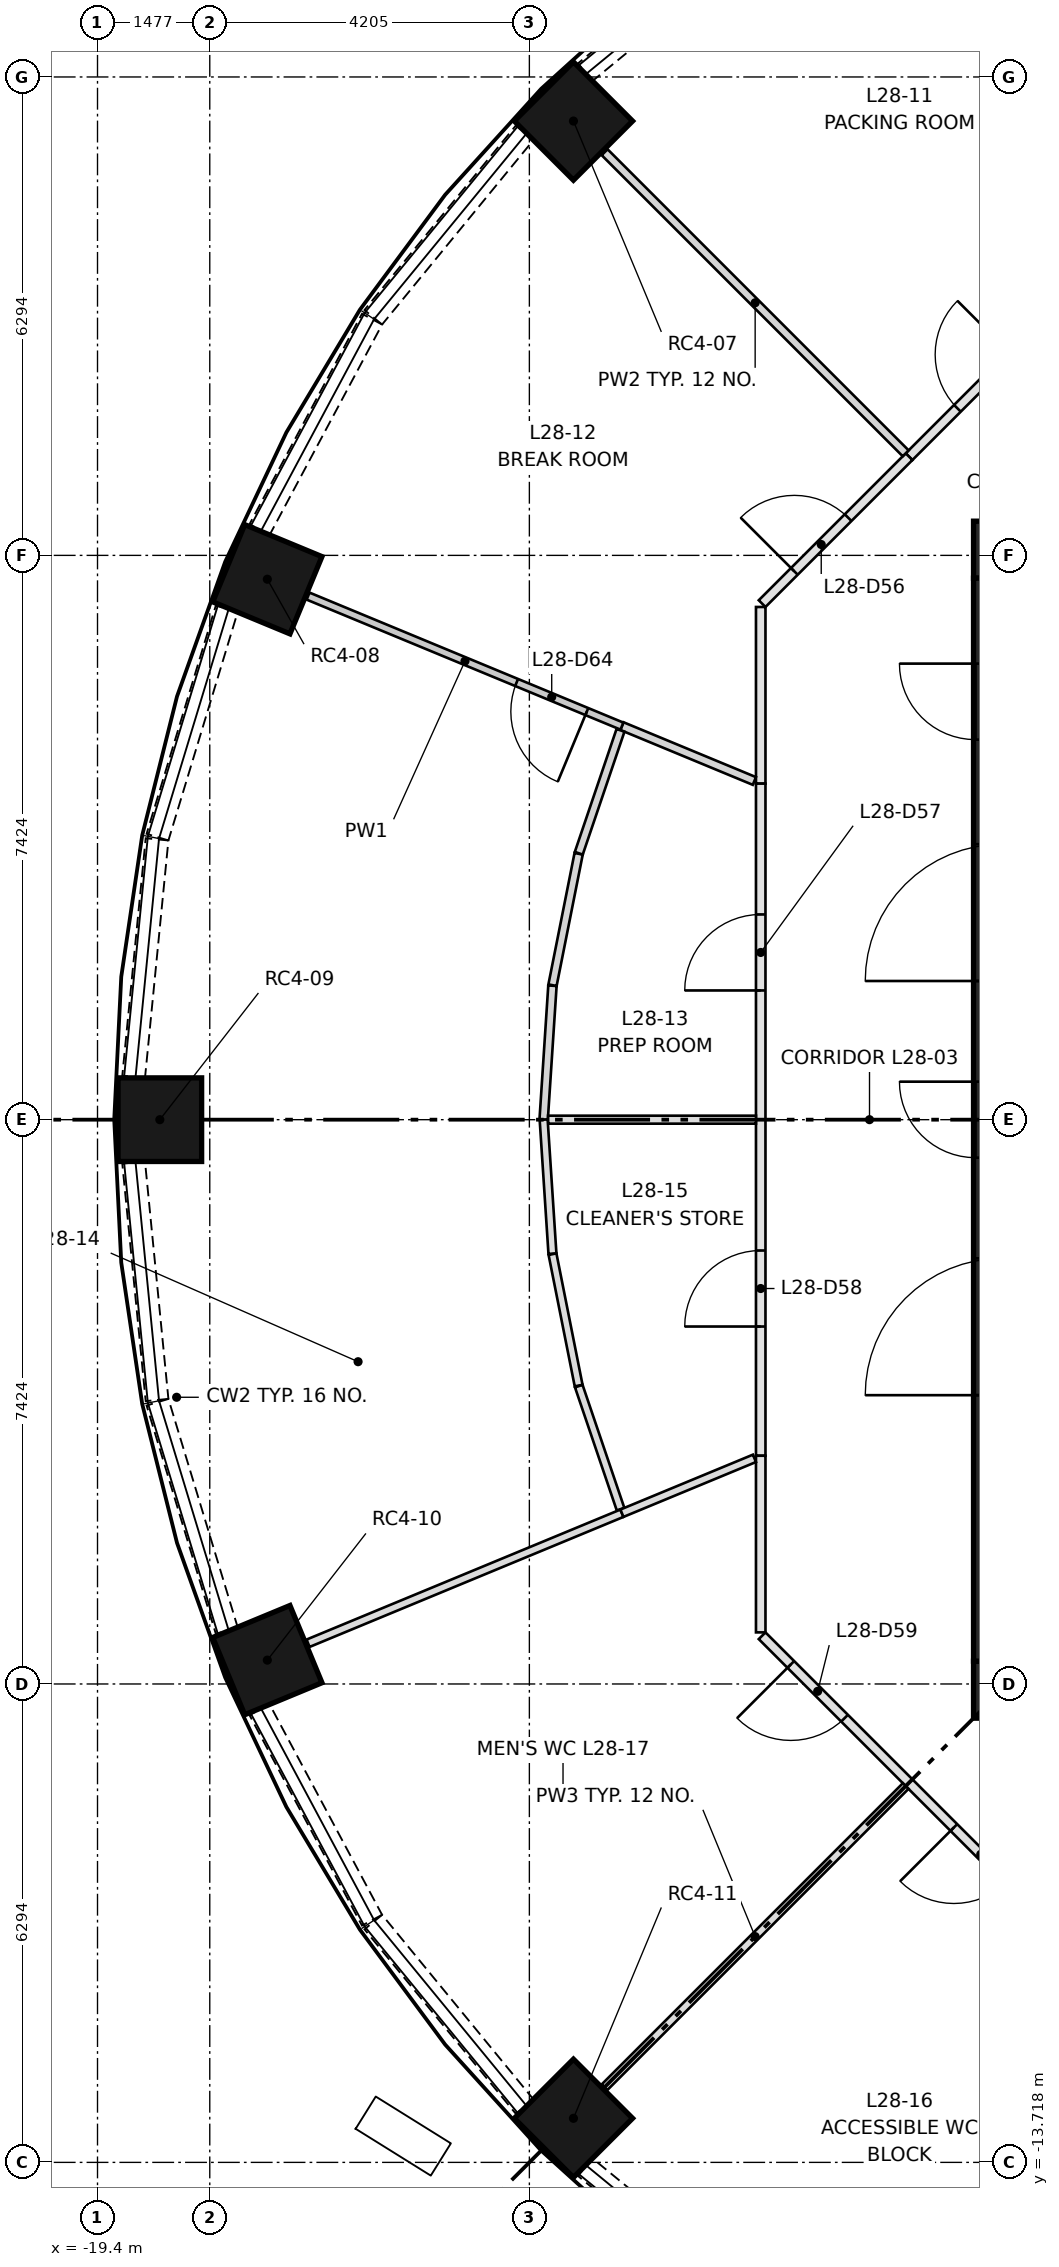
"""IFC4 building model, lengths in metres.
Left out: names, types, materials, properties, quantities, classifications, styles, units other than length and angle.
Written with IfcOpenShell. Run it as: python <this file> out.ifc"""

import sys

from ifc_helpers import new_model, si_unit, direction, frame, frame_2d, origin, origin_2d, place, context, subcontext, project, spatial, rectangle, extrude, element, fill, save


model = new_model("IFC4")
c1 = context("Model", 3, precision=1e-05, world=origin(), true_north=direction((0.0, 1.0)))
c2 = subcontext(c1, "Body", "Model", "MODEL_VIEW")
j1 = project(units=[si_unit("LENGTHUNIT", "METRE"), si_unit("PLANEANGLEUNIT", "RADIAN")], contexts=[c1])
p1 = place(None, origin())
s1 = spatial("IfcSite", under=j1, at=p1, CompositionType="ELEMENT")
p2 = place(p1, origin())
s2 = spatial("IfcBuilding", under=s1, at=p2, CompositionType="ELEMENT")
p3 = place(p2, frame((0.0, 0.0, 109.25)))
s3 = spatial("IfcBuildingStorey", under=s2, at=p3, CompositionType="ELEMENT", Elevation=109.25)
for number, where, z_axis, x_axis in (
    (1, (-13.138, 13.138, 0.0), (0.0, 0.0, 1.0), (-0.707, 0.707, 0.0)),
    (2, (-17.166, 7.11, 0.0), (0.0, 0.0, 1.0), (-0.924, 0.383, 0.0)),
    (3, (-18.58, 0.0, 0.0), (0.0, 0.0, 1.0), (-1.0, 0.0, 0.0)),
    (4, (-17.166, -7.11, 0.0), (0.0, 0.0, 1.0), (-0.924, -0.383, 0.0)),
    (5, (-13.138, -13.138, 0.0), (0.0, 0.0, 1.0), (-0.707, -0.707, 0.0)),
):
    element("IfcColumn", number, at=place(p3, frame(where, z_axis=z_axis, x_axis=x_axis)), inside=s3, PredefinedType="COLUMN", context=c2, shape_type="SweptSolid", body=[
        extrude(rectangle(XDim=1.1, YDim=1.1, at=origin_2d()), origin(), (0.0, 0.0, 1.0), 3.65),
    ])
for number, where, z_axis, x_axis in (
    (6, (-7.874, -7.499, 0.0), (0.0, 0.0, 1.0), (1.0, 0.0, 0.0)),
    (7, (-7.874, 7.499, 0.0), (0.0, 0.0, 1.0), (1.0, 0.0, 0.0)),
):
    element("IfcWall", number, at=place(p3, frame(where, z_axis=z_axis, x_axis=x_axis)), inside=s3, PredefinedType="SHEAR", context=c2, shape_type="SweptSolid", body=[
        extrude(rectangle(XDim=15.748, YDim=0.75, at=frame_2d((7.874, 0.0))), origin(), (0.0, 0.0, 1.0), 3.65),
    ])
p4 = place(p3, frame((-7.499, -7.124, 0.0), z_axis=(0.0, 0.0, 1.0), x_axis=(0.0, 1.0, 0.0)))
e8 = element("IfcWall", 8, at=p4, inside=s3, PredefinedType="SHEAR", context=c2, shape_type="SweptSolid", body=[
    extrude(rectangle(XDim=14.248, YDim=0.75, at=frame_2d((7.124, 0.0))), origin(), (0.0, 0.0, 1.0), 3.65),
])
p5 = place(p4, frame((6.624, 0.0, 0.0)))
e9 = element("IfcOpeningElement", 9, at=p5, cuts=e8, PredefinedType="OPENING", context=c2, shape_type="SweptSolid", body=[
    extrude(rectangle(XDim=1.0, YDim=2.1, at=frame_2d((0.5, 1.05))), frame((0.0, 0.385, 0.0), z_axis=(0.0, -1.0, 0.0), x_axis=(1.0, 0.0, 0.0)), (0.0, 0.0, 1.0), 0.77),
])
p6 = place(p4, frame((3.5, 0.0, 0.0)))
e10 = element("IfcOpeningElement", 10, at=p6, cuts=e8, PredefinedType="OPENING", context=c2, shape_type="SweptSolid", body=[
    extrude(rectangle(XDim=1.8, YDim=2.1, at=frame_2d((0.9, 1.05))), frame((0.0, 0.385, 0.0), z_axis=(0.0, -1.0, 0.0), x_axis=(1.0, 0.0, 0.0)), (0.0, 0.0, 1.0), 0.77),
])
p7 = place(p4, frame((8.948, 0.0, 0.0)))
e11 = element("IfcOpeningElement", 11, at=p7, cuts=e8, PredefinedType="OPENING", context=c2, shape_type="SweptSolid", body=[
    extrude(rectangle(XDim=1.8, YDim=2.1, at=frame_2d((0.9, 1.05))), frame((0.0, 0.385, 0.0), z_axis=(0.0, -1.0, 0.0), x_axis=(1.0, 0.0, 0.0)), (0.0, 0.0, 1.0), 0.77),
])
p8 = place(p4, frame((12.124, 0.0, 0.0)))
e12 = element("IfcOpeningElement", 12, at=p8, cuts=e8, PredefinedType="OPENING", context=c2, shape_type="SweptSolid", body=[
    extrude(rectangle(XDim=1.0, YDim=2.1, at=frame_2d((0.5, 1.05))), frame((0.0, 0.385, 0.0), z_axis=(0.0, -1.0, 0.0), x_axis=(1.0, 0.0, 0.0)), (0.0, 0.0, 1.0), 0.77),
])
for number, where, z_axis, x_axis in (
    (13, (-10.557, 15.771, 0.0), (0.0, 0.0, 1.0), (-0.773, -0.634, 0.0)),
    (14, (-13.781, 12.983, 0.0), (0.0, 0.0, 1.0), (-0.634, -0.773, 0.0)),
):
    element("IfcWall", number, at=place(p3, frame(where, z_axis=z_axis, x_axis=x_axis)), inside=s3, PredefinedType="SOLIDWALL", context=c2, shape_type="SweptSolid", body=[
        extrude(rectangle(XDim=3.139, YDim=0.3, at=frame_2d((1.569, 0.0))), origin(), (0.0, 0.0, 1.0), 0.9),
    ])
p9 = place(p3, frame((-15.788, 10.532, 0.0), z_axis=(0.0, 0.0, 1.0), x_axis=(-0.471375185282, -0.88193278355, 0.0)))
e15 = element("IfcWall", 15, at=p9, inside=s3, PredefinedType="SOLIDWALL", context=c2, shape_type="SweptSolid", body=[
    extrude(rectangle(XDim=3.139, YDim=0.3, at=frame_2d((1.57, 0.0))), origin(), (0.0, 0.0, 1.0), 0.9),
])
p10 = place(p3, frame((-17.699, 6.722, 0.0), z_axis=(0.0, 0.0, 1.0), x_axis=(-0.290214584271, -0.956961595403, 0.0)))
e16 = element("IfcWall", 16, at=p10, inside=s3, PredefinedType="SOLIDWALL", context=c2, shape_type="SweptSolid", body=[
    extrude(rectangle(XDim=3.139, YDim=0.3, at=frame_2d((1.57, 0.0))), origin(), (0.0, 0.0, 1.0), 0.9),
])
for number, where, z_axis, x_axis in (
    (17, (-18.616, 3.688, 0.0), (0.0, 0.0, 1.0), (-0.098, -0.995, 0.0)),
    (18, (-18.925, -0.564, 0.0), (0.0, 0.0, 1.0), (0.098, -0.995, 0.0)),
):
    element("IfcWall", number, at=place(p3, frame(where, z_axis=z_axis, x_axis=x_axis)), inside=s3, PredefinedType="SOLIDWALL", context=c2, shape_type="SweptSolid", body=[
        extrude(rectangle(XDim=3.139, YDim=0.3, at=frame_2d((1.57, 0.0))), origin(), (0.0, 0.0, 1.0), 0.9),
    ])
p11 = place(p3, frame((-18.611, -3.717, 0.0), z_axis=(0.0, 0.0, 1.0), x_axis=(0.290214584271, -0.956961595403, 0.0)))
e19 = element("IfcWall", 19, at=p11, inside=s3, PredefinedType="SOLIDWALL", context=c2, shape_type="SweptSolid", body=[
    extrude(rectangle(XDim=3.139, YDim=0.3, at=frame_2d((1.57, 0.0))), origin(), (0.0, 0.0, 1.0), 0.9),
])
p12 = place(p3, frame((-17.268, -7.763, 0.0), z_axis=(0.0, 0.0, 1.0), x_axis=(0.471375185282, -0.88193278355, 0.0)))
e20 = element("IfcWall", 20, at=p12, inside=s3, PredefinedType="SOLIDWALL", context=c2, shape_type="SweptSolid", body=[
    extrude(rectangle(XDim=3.139, YDim=0.3, at=frame_2d((1.57, 0.0))), origin(), (0.0, 0.0, 1.0), 0.9),
])
for number, where, z_axis, x_axis in (
    (21, (-15.771, -10.557, 0.0), (0.0, 0.0, 1.0), (0.634, -0.773, 0.0)),
    (22, (-12.983, -13.781, 0.0), (0.0, 0.0, 1.0), (0.773, -0.634, 0.0)),
):
    element("IfcWall", number, at=place(p3, frame(where, z_axis=z_axis, x_axis=x_axis)), inside=s3, PredefinedType="SOLIDWALL", context=c2, shape_type="SweptSolid", body=[
        extrude(rectangle(XDim=3.139, YDim=0.3, at=frame_2d((1.569, 0.0))), origin(), (0.0, 0.0, 1.0), 0.9),
    ])
p13 = place(p3, frame((-8.722, 8.722, 0.0), z_axis=(0.0, 0.0, 1.0), x_axis=(0.707062130741, 0.707151428813, 0.0)))
e23 = element("IfcWall", 23, at=p13, inside=s3, PredefinedType="PARTITIONING", context=c2, shape_type="SweptSolid", body=[
    extrude(rectangle(XDim=2.734, YDim=0.125, at=frame_2d((1.367, 0.0))), origin(), (0.0, 0.0, 1.0), 3.3),
])
p14 = place(p13, frame((0.9, 0.0, 0.0)))
e24 = element("IfcOpeningElement", 24, at=p14, cuts=e23, PredefinedType="OPENING", context=c2, shape_type="SweptSolid", body=[
    extrude(rectangle(XDim=1.0, YDim=2.1, at=frame_2d((0.5, 1.05))), frame((0.0, 0.073, 0.0), z_axis=(0.0, -1.0, 0.0), x_axis=(1.0, 0.0, 0.0)), (0.0, 0.0, 1.0), 0.145),
])
p15 = place(p3, frame((-10.674, 4.421, 0.0), z_axis=(0.0, 0.0, 1.0), x_axis=(0.0, 1.0, 0.0)))
e25 = element("IfcWall", 25, at=p15, inside=s3, PredefinedType="PARTITIONING", context=c2, shape_type="SweptSolid", body=[
    extrude(rectangle(XDim=2.324, YDim=0.125, at=frame_2d((1.162, 0.0))), origin(), (0.0, 0.0, 1.0), 3.3),
])
p16 = place(p3, frame((-10.656, 6.789, 0.0), z_axis=(0.0, 0.0, 1.0), x_axis=(0.707151428813, 0.707062130741, 0.0)))
e26 = element("IfcWall", 26, at=p16, inside=s3, PredefinedType="PARTITIONING", context=c2, shape_type="SweptSolid", body=[
    extrude(rectangle(XDim=2.734, YDim=0.125, at=frame_2d((1.367, 0.0))), origin(), (0.0, 0.0, 1.0), 3.3),
])
p17 = place(p16, frame((0.6, 0.0, 0.0)))
e27 = element("IfcOpeningElement", 27, at=p17, cuts=e26, PredefinedType="OPENING", context=c2, shape_type="SweptSolid", body=[
    extrude(rectangle(XDim=1.0, YDim=2.1, at=frame_2d((0.5, 1.05))), frame((0.0, 0.073, 0.0), z_axis=(0.0, -1.0, 0.0), x_axis=(1.0, 0.0, 0.0)), (0.0, 0.0, 1.0), 0.145),
])
p18 = place(p3, frame((-10.674, 0.0, 0.0), z_axis=(0.0, 0.0, 1.0), x_axis=(0.0, 1.0, 0.0)))
e28 = element("IfcWall", 28, at=p18, inside=s3, PredefinedType="PARTITIONING", context=c2, shape_type="SweptSolid", body=[
    extrude(rectangle(XDim=4.421, YDim=0.125, at=frame_2d((2.211, 0.0))), origin(), (0.0, 0.0, 1.0), 3.3),
])
p19 = place(p18, frame((1.7, 0.0, 0.0)))
e29 = element("IfcOpeningElement", 29, at=p19, cuts=e28, PredefinedType="OPENING", context=c2, shape_type="SweptSolid", body=[
    extrude(rectangle(XDim=1.0, YDim=2.1, at=frame_2d((0.5, 1.05))), frame((0.0, 0.073, 0.0), z_axis=(0.0, -1.0, 0.0), x_axis=(1.0, 0.0, 0.0)), (0.0, 0.0, 1.0), 0.145),
])
p20 = place(p3, frame((-10.674, -4.421, 0.0), z_axis=(0.0, 0.0, 1.0), x_axis=(0.0, 1.0, 0.0)))
e30 = element("IfcWall", 30, at=p20, inside=s3, PredefinedType="PARTITIONING", context=c2, shape_type="SweptSolid", body=[
    extrude(rectangle(XDim=4.421, YDim=0.125, at=frame_2d((2.211, 0.0))), origin(), (0.0, 0.0, 1.0), 3.3),
])
p21 = place(p20, frame((1.7, 0.0, 0.0)))
e31 = element("IfcOpeningElement", 31, at=p21, cuts=e30, PredefinedType="OPENING", context=c2, shape_type="SweptSolid", body=[
    extrude(rectangle(XDim=1.0, YDim=2.1, at=frame_2d((0.5, 1.05))), frame((0.0, 0.073, 0.0), z_axis=(0.0, -1.0, 0.0), x_axis=(1.0, 0.0, 0.0)), (0.0, 0.0, 1.0), 0.145),
])
p22 = place(p3, frame((-10.674, -6.745, 0.0), z_axis=(0.0, 0.0, 1.0), x_axis=(0.0, 1.0, 0.0)))
e32 = element("IfcWall", 32, at=p22, inside=s3, PredefinedType="PARTITIONING", context=c2, shape_type="SweptSolid", body=[
    extrude(rectangle(XDim=2.324, YDim=0.125, at=frame_2d((1.162, 0.0))), origin(), (0.0, 0.0, 1.0), 3.3),
])
p23 = place(p3, frame((-8.722, -8.722, 0.0), z_axis=(0.0, 0.0, 1.0), x_axis=(-0.707151428813, 0.707062130741, 0.0)))
e33 = element("IfcWall", 33, at=p23, inside=s3, PredefinedType="PARTITIONING", context=c2, shape_type="SweptSolid", body=[
    extrude(rectangle(XDim=2.734, YDim=0.125, at=frame_2d((1.367, 0.0))), origin(), (0.0, 0.0, 1.0), 3.3),
])
p24 = place(p23, frame((1.2, 0.0, 0.0)))
e34 = element("IfcOpeningElement", 34, at=p24, cuts=e33, PredefinedType="OPENING", context=c2, shape_type="SweptSolid", body=[
    extrude(rectangle(XDim=1.0, YDim=2.1, at=frame_2d((0.5, 1.05))), frame((0.0, 0.073, 0.0), z_axis=(0.0, -1.0, 0.0), x_axis=(1.0, 0.0, 0.0)), (0.0, 0.0, 1.0), 0.145),
])
p25 = place(p3, frame((-6.789, -10.656, 0.0), z_axis=(0.0, 0.0, 1.0), x_axis=(-0.707062130741, 0.707151428813, 0.0)))
e35 = element("IfcWall", 35, at=p25, inside=s3, PredefinedType="PARTITIONING", context=c2, shape_type="SweptSolid", body=[
    extrude(rectangle(XDim=2.734, YDim=0.125, at=frame_2d((1.367, 0.0))), origin(), (0.0, 0.0, 1.0), 3.3),
])
p26 = place(p25, frame((0.9, 0.0, 0.0)))
e36 = element("IfcOpeningElement", 36, at=p26, cuts=e35, PredefinedType="OPENING", context=c2, shape_type="SweptSolid", body=[
    extrude(rectangle(XDim=1.0, YDim=2.1, at=frame_2d((0.5, 1.05))), frame((0.0, 0.073, 0.0), z_axis=(0.0, -1.0, 0.0), x_axis=(1.0, 0.0, 0.0)), (0.0, 0.0, 1.0), 0.145),
])
p27 = place(p3, frame((-8.767, 8.767, 0.0), z_axis=(0.0, 0.0, 1.0), x_axis=(-0.707106781187, 0.707106781187, 0.0)))
e37 = element("IfcWall", 37, at=p27, inside=s3, PredefinedType="PARTITIONING", context=c2, shape_type="SweptSolid", body=[
    extrude(rectangle(XDim=5.602, YDim=0.11, at=frame_2d((2.801, 0.0))), origin(), (0.0, 0.0, 1.0), 3.3),
])
p28 = place(p3, frame((-10.758, 4.456, 0.0), z_axis=(0.0, 0.0, 1.0), x_axis=(-0.923844847366, 0.382767158983, 0.0)))
e38 = element("IfcWall", 38, at=p28, inside=s3, PredefinedType="PARTITIONING", context=c2, shape_type="SweptSolid", body=[
    extrude(rectangle(XDim=1.886, YDim=0.11, at=frame_2d((0.943, 0.0))), origin(), (0.0, 0.0, 1.0), 3.3),
])
p29 = place(p3, frame((-12.5, 5.178, 0.0), z_axis=(0.0, 0.0, 1.0), x_axis=(-0.923895686767, 0.382644430213, 0.0)))
e39 = element("IfcWall", 39, at=p29, inside=s3, PredefinedType="PARTITIONING", context=c2, shape_type="SweptSolid", body=[
    extrude(rectangle(XDim=4.47, YDim=0.1, at=frame_2d((2.235, 0.0))), origin(), (0.0, 0.0, 1.0), 3.3),
])
p30 = place(p29, frame((0.5, 0.0, 0.0)))
e40 = element("IfcOpeningElement", 40, at=p30, cuts=e39, PredefinedType="OPENING", context=c2, shape_type="SweptSolid", body=[
    extrude(rectangle(XDim=1.0, YDim=2.1, at=frame_2d((0.5, 1.05))), frame((0.0, 0.06, 0.0), z_axis=(0.0, -1.0, 0.0), x_axis=(1.0, 0.0, 0.0)), (0.0, 0.0, 1.0), 0.12),
])
p31 = place(p3, frame((-13.53, 0.0, 0.0), z_axis=(0.0, 0.0, 1.0), x_axis=(0.06551898146, 0.997851323128, 0.0)))
e41 = element("IfcWall", 41, at=p31, inside=s3, PredefinedType="PARTITIONING", context=c2, shape_type="SweptSolid", body=[
    extrude(rectangle(XDim=1.766, YDim=0.11, at=frame_2d((0.883, 0.0))), origin(), (0.0, 0.0, 1.0), 3.3),
])
p32 = place(p3, frame((-13.414, 1.77, 0.0), z_axis=(0.0, 0.0, 1.0), x_axis=(0.195157142921, 0.980771986532, 0.0)))
e42 = element("IfcWall", 42, at=p32, inside=s3, PredefinedType="PARTITIONING", context=c2, shape_type="SweptSolid", body=[
    extrude(rectangle(XDim=1.763, YDim=0.11, at=frame_2d((0.881, 0.0))), origin(), (0.0, 0.0, 1.0), 3.3),
])
p33 = place(p3, frame((-13.068, 3.505, 0.0), z_axis=(0.0, 0.0, 1.0), x_axis=(0.321413111924, 0.946939074853, 0.0)))
e43 = element("IfcWall", 43, at=p33, inside=s3, PredefinedType="PARTITIONING", context=c2, shape_type="SweptSolid", body=[
    extrude(rectangle(XDim=1.708, YDim=0.11, at=frame_2d((0.854, 0.0))), origin(), (0.0, 0.0, 1.0), 3.3),
])
p34 = place(p3, frame((-10.737, 0.0, 0.0), z_axis=(0.0, 0.0, 1.0), x_axis=(-1.0, 0.0, 0.0)))
e44 = element("IfcWall", 44, at=p34, inside=s3, PredefinedType="PARTITIONING", context=c2, shape_type="SweptSolid", body=[
    extrude(rectangle(XDim=2.735, YDim=0.105, at=frame_2d((1.367, 0.0))), origin(), (0.0, 0.0, 1.0), 3.3),
])
p35 = place(p3, frame((-13.53, 0.0, 0.0), z_axis=(0.0, 0.0, 1.0), x_axis=(0.065509945756, -0.997851916372, 0.0)))
e45 = element("IfcWall", 45, at=p35, inside=s3, PredefinedType="PARTITIONING", context=c2, shape_type="SweptSolid", body=[
    extrude(rectangle(XDim=1.767, YDim=0.105, at=frame_2d((0.883, 0.0))), origin(), (0.0, 0.0, 1.0), 3.3),
])
p36 = place(p3, frame((-13.414, -1.769, 0.0), z_axis=(0.0, 0.0, 1.0), x_axis=(0.19513063546, -0.980777260699, 0.0)))
e46 = element("IfcWall", 46, at=p36, inside=s3, PredefinedType="PARTITIONING", context=c2, shape_type="SweptSolid", body=[
    extrude(rectangle(XDim=1.763, YDim=0.105, at=frame_2d((0.881, 0.0))), origin(), (0.0, 0.0, 1.0), 3.3),
])
p37 = place(p3, frame((-13.068, -3.505, 0.0), z_axis=(0.0, 0.0, 1.0), x_axis=(0.321490655205, -0.946912751322, 0.0)))
e47 = element("IfcWall", 47, at=p37, inside=s3, PredefinedType="PARTITIONING", context=c2, shape_type="SweptSolid", body=[
    extrude(rectangle(XDim=1.71, YDim=0.105, at=frame_2d((0.855, 0.0))), origin(), (0.0, 0.0, 1.0), 3.3),
])
p38 = place(p3, frame((-12.5, -5.178, 0.0), z_axis=(0.0, 0.0, 1.0), x_axis=(-0.923895686767, -0.382644430213, 0.0)))
e48 = element("IfcWall", 48, at=p38, inside=s3, PredefinedType="PARTITIONING", context=c2, shape_type="SweptSolid", body=[
    extrude(rectangle(XDim=4.47, YDim=0.105, at=frame_2d((2.235, 0.0))), origin(), (0.0, 0.0, 1.0), 3.3),
])
p39 = place(p3, frame((-10.757, -4.456, 0.0), z_axis=(0.0, 0.0, 1.0), x_axis=(-0.923874914803, -0.382694580309, 0.0)))
e49 = element("IfcWall", 49, at=p39, inside=s3, PredefinedType="PARTITIONING", context=c2, shape_type="SweptSolid", body=[
    extrude(rectangle(XDim=1.887, YDim=0.105, at=frame_2d((0.943, 0.0))), origin(), (0.0, 0.0, 1.0), 3.3),
])
p40 = place(p3, frame((-12.728, -12.728, 0.0), z_axis=(0.0, 0.0, 1.0), x_axis=(0.707106781187, 0.707106781187, 0.0)))
e50 = element("IfcWall", 50, at=p40, inside=s3, PredefinedType="PARTITIONING", context=c2, shape_type="SweptSolid", body=[
    extrude(rectangle(XDim=5.602, YDim=0.105, at=frame_2d((2.801, 0.0))), origin(), (0.0, 0.0, 1.0), 3.3),
])
p41 = place(p5, origin())
e51 = element("IfcDoor", 51, at=p41, inside=s3, OperationType="SINGLE_SWING_RIGHT", PredefinedType="DOOR", context=c2, shape_type="SweptSolid", body=[
    extrude(rectangle(XDim=1.0, YDim=2.1, at=frame_2d((0.5, 1.05))), frame((0.0, 0.375, 0.0), z_axis=(0.0, -1.0, 0.0), x_axis=(1.0, 0.0, 0.0)), (0.0, 0.0, 1.0), 0.05),
])
fill(e9, e51)
p42 = place(p8, origin())
e52 = element("IfcDoor", 52, at=p42, inside=s3, OperationType="SINGLE_SWING_RIGHT", PredefinedType="DOOR", context=c2, shape_type="SweptSolid", body=[
    extrude(rectangle(XDim=1.0, YDim=2.1, at=frame_2d((0.5, 1.05))), frame((0.0, 0.375, 0.0), z_axis=(0.0, -1.0, 0.0), x_axis=(1.0, 0.0, 0.0)), (0.0, 0.0, 1.0), 0.05),
])
fill(e12, e52)
p43 = place(p14, origin())
e53 = element("IfcDoor", 53, at=p43, inside=s3, OperationType="SINGLE_SWING_RIGHT", PredefinedType="DOOR", context=c2, shape_type="SweptSolid", body=[
    extrude(rectangle(XDim=1.0, YDim=2.1, at=frame_2d((0.5, 1.05))), frame((0.0, 0.025, 0.0), z_axis=(0.0, -1.0, 0.0), x_axis=(1.0, 0.0, 0.0)), (0.0, 0.0, 1.0), 0.05),
])
fill(e24, e53)
p44 = place(p17, origin())
e54 = element("IfcDoor", 54, at=p44, inside=s3, OperationType="SINGLE_SWING_LEFT", PredefinedType="DOOR", context=c2, shape_type="SweptSolid", body=[
    extrude(rectangle(XDim=1.0, YDim=2.1, at=frame_2d((0.5, 1.05))), frame((0.0, 0.025, 0.0), z_axis=(0.0, -1.0, 0.0), x_axis=(1.0, 0.0, 0.0)), (0.0, 0.0, 1.0), 0.05),
])
fill(e27, e54)
p45 = place(p19, origin())
e55 = element("IfcDoor", 55, at=p45, inside=s3, OperationType="SINGLE_SWING_LEFT", PredefinedType="DOOR", context=c2, shape_type="SweptSolid", body=[
    extrude(rectangle(XDim=1.0, YDim=2.1, at=frame_2d((0.5, 1.05))), frame((0.0, 0.025, 0.0), z_axis=(0.0, -1.0, 0.0), x_axis=(1.0, 0.0, 0.0)), (0.0, 0.0, 1.0), 0.05),
])
fill(e29, e55)
p46 = place(p21, origin())
e56 = element("IfcDoor", 56, at=p46, inside=s3, OperationType="SINGLE_SWING_LEFT", PredefinedType="DOOR", context=c2, shape_type="SweptSolid", body=[
    extrude(rectangle(XDim=1.0, YDim=2.1, at=frame_2d((0.5, 1.05))), frame((0.0, 0.025, 0.0), z_axis=(0.0, -1.0, 0.0), x_axis=(1.0, 0.0, 0.0)), (0.0, 0.0, 1.0), 0.05),
])
fill(e31, e56)
p47 = place(p24, origin())
e57 = element("IfcDoor", 57, at=p47, inside=s3, OperationType="SINGLE_SWING_RIGHT", PredefinedType="DOOR", context=c2, shape_type="SweptSolid", body=[
    extrude(rectangle(XDim=1.0, YDim=2.1, at=frame_2d((0.5, 1.05))), frame((0.0, 0.025, 0.0), z_axis=(0.0, -1.0, 0.0), x_axis=(1.0, 0.0, 0.0)), (0.0, 0.0, 1.0), 0.05),
])
fill(e34, e57)
p48 = place(p26, origin())
e58 = element("IfcDoor", 58, at=p48, inside=s3, OperationType="SINGLE_SWING_RIGHT", PredefinedType="DOOR", context=c2, shape_type="SweptSolid", body=[
    extrude(rectangle(XDim=1.0, YDim=2.1, at=frame_2d((0.5, 1.05))), frame((0.0, 0.025, 0.0), z_axis=(0.0, -1.0, 0.0), x_axis=(1.0, 0.0, 0.0)), (0.0, 0.0, 1.0), 0.05),
])
fill(e36, e58)
p49 = place(p30, origin())
e59 = element("IfcDoor", 59, at=p49, inside=s3, OperationType="SINGLE_SWING_LEFT", PredefinedType="DOOR", context=c2, shape_type="SweptSolid", body=[
    extrude(rectangle(XDim=1.0, YDim=2.1, at=frame_2d((0.5, 1.05))), frame((0.0, 0.025, 0.0), z_axis=(0.0, -1.0, 0.0), x_axis=(1.0, 0.0, 0.0)), (0.0, 0.0, 1.0), 0.05),
])
fill(e40, e59)
save(model, sys.argv[1])
